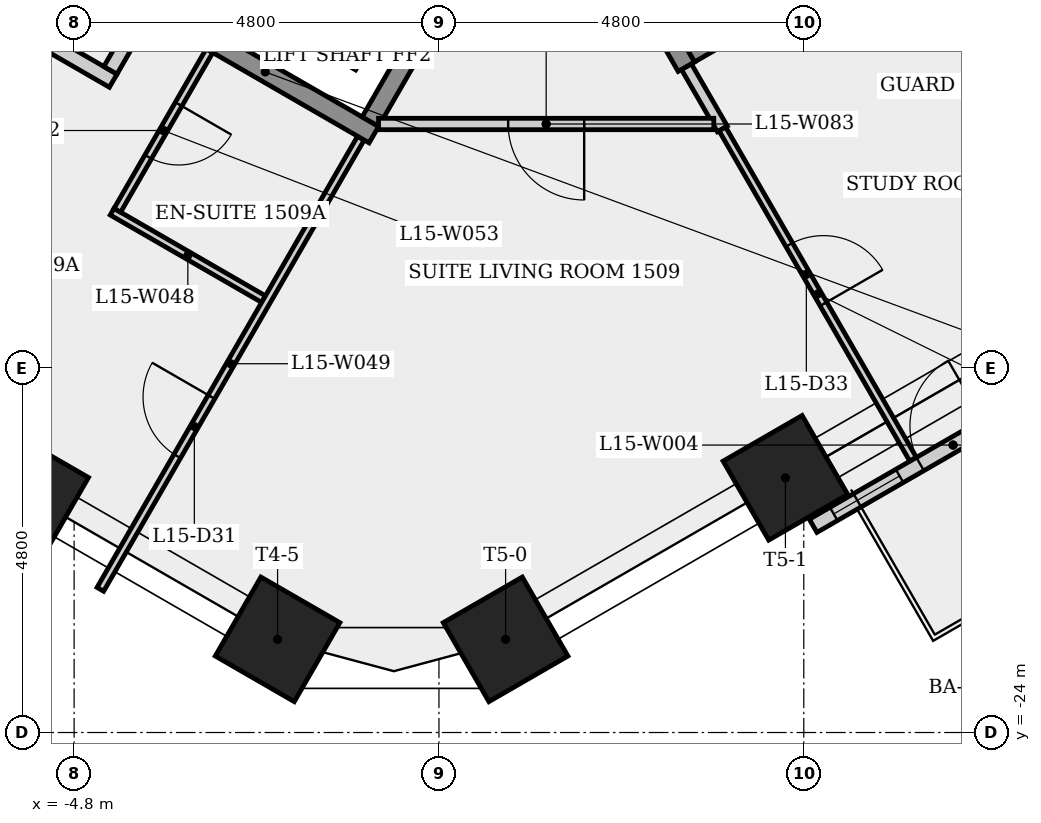
"""IFC4 building model, lengths in metres.
Left out: names, types, materials, properties, quantities, classifications, styles, units other than length and angle.
Written with IfcOpenShell. Run it as: python <this file> out.ifc"""

import sys

from ifc_helpers import new_model, si_unit, direction, frame, frame_2d, origin, origin_2d, place, context, subcontext, project, spatial, rectangle, extrude, element, fill, save


model = new_model("IFC4")
c1 = context("Model", 3, precision=1e-05, world=origin(), true_north=direction((0.0, 1.0)))
c2 = subcontext(c1, "Body", "Model", "MODEL_VIEW")
j1 = project(units=[si_unit("LENGTHUNIT", "METRE"), si_unit("PLANEANGLEUNIT", "RADIAN")], contexts=[c1])
p1 = place(None, origin())
s1 = spatial("IfcSite", under=j1, at=p1, CompositionType="ELEMENT")
p2 = place(p1, origin())
s2 = spatial("IfcBuilding", under=s1, at=p2, CompositionType="ELEMENT")
p3 = place(p2, frame((0.0, 0.0, 59.5)))
s3 = spatial("IfcBuildingStorey", under=s2, at=p3, CompositionType="ELEMENT", Elevation=59.5)
for number, where, z_axis, x_axis in (
    (1, (-5.431, -20.865, 0.0), (0.0, 0.0, 1.0), (-0.5, -0.866, 0.0)),
    (2, (-2.123, -22.774, 0.0), (0.0, 0.0, 1.0), (-0.5, -0.866, 0.0)),
    (3, (0.877, -22.774, 0.0), (0.0, 0.0, 1.0), (0.5, -0.866, 0.0)),
    (4, (4.558, -20.649, 0.0), (0.0, 0.0, 1.0), (0.5, -0.866, 0.0)),
):
    element("IfcColumn", number, at=place(p3, frame(where, z_axis=z_axis, x_axis=x_axis)), inside=s3, PredefinedType="COLUMN", context=c2, shape_type="SweptSolid", body=[
        extrude(rectangle(XDim=1.2, YDim=1.2, at=origin_2d()), origin(), (0.0, 0.0, 1.0), 3.4),
    ])
p4 = place(p3, frame((4.923, -21.281, 0.0), z_axis=(0.0, 0.0, 1.0), x_axis=(0.866036396571, 0.499980959452, 0.0)))
e5 = element("IfcWall", 5, at=p4, inside=s3, PredefinedType="SOLIDWALL", context=c2, shape_type="SweptSolid", body=[
    extrude(rectangle(XDim=4.251, YDim=0.2, at=frame_2d((2.125, 0.0))), origin(), (0.0, 0.0, 1.0), 3.4),
])
p5 = place(p4, frame((1.625, 0.0, 0.0)))
e6 = element("IfcOpeningElement", 6, at=p5, cuts=e5, PredefinedType="OPENING", context=c2, shape_type="SweptSolid", body=[
    extrude(rectangle(XDim=1.0, YDim=2.4, at=frame_2d((0.5, 1.2))), frame((0.0, 0.11, 0.0), z_axis=(0.0, -1.0, 0.0), x_axis=(1.0, 0.0, 0.0)), (0.0, 0.0, 1.0), 0.22),
])
p6 = place(p4, frame((0.313, 0.0, 0.9)))
e7 = element("IfcOpeningElement", 7, at=p6, cuts=e5, PredefinedType="OPENING", context=c2, shape_type="SweptSolid", body=[
    extrude(rectangle(XDim=1.0, YDim=1.5, at=frame_2d((0.5, 0.75))), frame((0.0, 0.11, 0.0), z_axis=(0.0, -1.0, 0.0), x_axis=(1.0, 0.0, 0.0)), (0.0, 0.0, 1.0), 0.22),
])
p7 = place(p4, frame((2.938, 0.0, 0.9)))
e8 = element("IfcOpeningElement", 8, at=p7, cuts=e5, PredefinedType="OPENING", context=c2, shape_type="SweptSolid", body=[
    extrude(rectangle(XDim=1.0, YDim=1.5, at=frame_2d((0.5, 0.75))), frame((0.0, 0.11, 0.0), z_axis=(0.0, -1.0, 0.0), x_axis=(1.0, 0.0, 0.0)), (0.0, 0.0, 1.0), 0.22),
])
p8 = place(p3, frame((-8.356, -13.073, 0.0), z_axis=(0.0, 0.0, 1.0), x_axis=(0.866038532462, -0.499977259774, 0.0)))
e9 = element("IfcWall", 9, at=p8, inside=s3, PredefinedType="PARTITIONING", context=c2, shape_type="SweptSolid", body=[
    extrude(rectangle(XDim=4.7, YDim=0.2, at=frame_2d((2.35, 0.0))), origin(), (0.0, 0.0, 1.0), 3.05),
])
p9 = place(p3, frame((-4.3, -17.147, 0.0), z_axis=(0.0, 0.0, 1.0), x_axis=(0.866053019151, -0.499952165731, 0.0)))
e10 = element("IfcWall", 10, at=p9, inside=s3, PredefinedType="PARTITIONING", context=c2, shape_type="SweptSolid", body=[
    extrude(rectangle(XDim=2.3, YDim=0.1, at=frame_2d((1.15, 0.0))), origin(), (0.0, 0.0, 1.0), 3.05),
])
p10 = place(p3, frame((-4.455, -22.116, 0.0), z_axis=(0.0, 0.0, 1.0), x_axis=(0.499984476993, 0.866034365811, 0.0)))
e11 = element("IfcWall", 11, at=p10, inside=s3, PredefinedType="PARTITIONING", context=c2, shape_type="SweptSolid", body=[
    extrude(rectangle(XDim=6.856, YDim=0.1, at=frame_2d((3.428, 0.0))), origin(), (0.0, 0.0, 1.0), 3.05),
])
p11 = place(p10, frame((2.023, 0.0, 0.0)))
e12 = element("IfcOpeningElement", 12, at=p11, cuts=e11, PredefinedType="OPENING", context=c2, shape_type="SweptSolid", body=[
    extrude(rectangle(XDim=0.9, YDim=2.1, at=frame_2d((0.45, 1.05))), frame((0.0, 0.06, 0.0), z_axis=(0.0, -1.0, 0.0), x_axis=(1.0, 0.0, 0.0)), (0.0, 0.0, 1.0), 0.12),
])
p12 = place(p3, frame((-3.885, -14.529, 0.0), z_axis=(0.0, 0.0, 1.0), x_axis=(-0.499859285417, -0.866106630146, 0.0)))
e13 = element("IfcWall", 13, at=p12, inside=s3, PredefinedType="PARTITIONING", context=c2, shape_type="SweptSolid", body=[
    extrude(rectangle(XDim=0.875, YDim=0.2, at=frame_2d((0.438, 0.0))), origin(), (0.0, 0.0, 1.0), 3.05),
])
p13 = place(p3, frame((-3.019, -15.029, 0.0), z_axis=(0.0, 0.0, 1.0), x_axis=(-0.499972286653, -0.866041403502, 0.0)))
e14 = element("IfcWall", 14, at=p13, inside=s3, PredefinedType="PARTITIONING", context=c2, shape_type="SweptSolid", body=[
    extrude(rectangle(XDim=2.425, YDim=0.1, at=frame_2d((1.212, 0.0))), origin(), (0.0, 0.0, 1.0), 3.05),
])
p14 = place(p13, frame((0.812, 0.0, 0.0)))
e15 = element("IfcOpeningElement", 15, at=p14, cuts=e14, PredefinedType="OPENING", context=c2, shape_type="SweptSolid", body=[
    extrude(rectangle(XDim=0.8, YDim=2.1, at=frame_2d((0.4, 1.05))), frame((0.0, 0.06, 0.0), z_axis=(0.0, -1.0, 0.0), x_axis=(1.0, 0.0, 0.0)), (0.0, 0.0, 1.0), 0.12),
])
p15 = place(p3, frame((-0.856, -16.133, 0.0), z_axis=(0.0, 0.0, 1.0), x_axis=(-0.866021716278, 0.500006386895, 0.0)))
e16 = element("IfcWall", 16, at=p15, inside=s3, PredefinedType="SHEAR", context=c2, shape_type="SweptSolid", body=[
    extrude(rectangle(XDim=3.3, YDim=0.25, at=frame_2d((1.65, 0.0))), origin(), (0.0, 0.0, 1.0), 3.05),
])
p16 = place(p3, frame((-0.902, -15.962, 0.0), z_axis=(0.0, 0.0, 1.0), x_axis=(0.499981517636, 0.866036074319, 0.0)))
e17 = element("IfcWall", 17, at=p16, inside=s3, PredefinedType="SHEAR", context=c2, shape_type="SweptSolid", body=[
    extrude(rectangle(XDim=2.61, YDim=0.25, at=frame_2d((1.305, 0.0))), origin(), (0.0, 0.0, 1.0), 3.05),
])
p17 = place(p3, frame((3.256, -15.239, 0.0), z_axis=(0.0, 0.0, 1.0), x_axis=(0.499886281871, -0.866091049023, 0.0)))
e18 = element("IfcWall", 18, at=p17, inside=s3, PredefinedType="PARTITIONING", context=c2, shape_type="SweptSolid", body=[
    extrude(rectangle(XDim=0.946, YDim=0.15, at=frame_2d((0.473, 0.0))), origin(), (0.0, 0.0, 1.0), 3.05),
])
p18 = place(p3, frame((3.256, -15.239, 0.0), z_axis=(0.0, 0.0, 1.0), x_axis=(-0.50002537861, 0.866010750942, 0.0)))
e19 = element("IfcWall", 19, at=p18, inside=s3, PredefinedType="SHEAR", context=c2, shape_type="SweptSolid", body=[
    extrude(rectangle(XDim=3.0, YDim=0.25, at=frame_2d((1.5, 0.0))), origin(), (0.0, 0.0, 1.0), 3.05),
])
p19 = place(p3, frame((3.616, -15.993, 0.0), z_axis=(0.0, 0.0, 1.0), x_axis=(-1.0, 0.0, 0.0)))
e20 = element("IfcWall", 20, at=p19, inside=s3, PredefinedType="PARTITIONING", context=c2, shape_type="SweptSolid", body=[
    extrude(rectangle(XDim=4.411, YDim=0.15, at=frame_2d((2.206, 0.0))), origin(), (0.0, 0.0, 1.0), 3.05),
])
p20 = place(p19, frame((1.706, 0.0, 0.0)))
e21 = element("IfcOpeningElement", 21, at=p20, cuts=e20, PredefinedType="OPENING", context=c2, shape_type="SweptSolid", body=[
    extrude(rectangle(XDim=1.0, YDim=2.1, at=frame_2d((0.5, 1.05))), frame((0.0, 0.085, 0.0), z_axis=(0.0, -1.0, 0.0), x_axis=(1.0, 0.0, 0.0)), (0.0, 0.0, 1.0), 0.17),
])
p21 = place(p3, frame((3.729, -16.058, 0.0), z_axis=(0.0, 0.0, 1.0), x_axis=(0.50000754391, -0.866021048262, 0.0)))
e22 = element("IfcWall", 22, at=p21, inside=s3, PredefinedType="PARTITIONING", context=c2, shape_type="SweptSolid", body=[
    extrude(rectangle(XDim=5.016, YDim=0.1, at=frame_2d((2.508, 0.0))), origin(), (0.0, 0.0, 1.0), 3.05),
])
p22 = place(p21, frame((1.76, 0.0, 0.0)))
e23 = element("IfcOpeningElement", 23, at=p22, cuts=e22, PredefinedType="OPENING", context=c2, shape_type="SweptSolid", body=[
    extrude(rectangle(XDim=0.9, YDim=2.1, at=frame_2d((0.45, 1.05))), frame((0.0, 0.06, 0.0), z_axis=(0.0, -1.0, 0.0), x_axis=(1.0, 0.0, 0.0)), (0.0, 0.0, 1.0), 0.12),
])
p23 = place(p3, frame((3.301, -15.068, 0.0), z_axis=(0.0, 0.0, 1.0), x_axis=(0.866035036182, 0.499983315828, 0.0)))
e24 = element("IfcWall", 24, at=p23, inside=s3, PredefinedType="SHEAR", context=c2, shape_type="SweptSolid", body=[
    extrude(rectangle(XDim=6.4, YDim=0.25, at=frame_2d((3.2, 0.0))), origin(), (0.0, 0.0, 1.0), 3.05),
])
p24 = place(p5, origin())
e25 = element("IfcDoor", 25, at=p24, inside=s3, OperationType="SINGLE_SWING_RIGHT", PredefinedType="DOOR", context=c2, shape_type="SweptSolid", body=[
    extrude(rectangle(XDim=1.0, YDim=2.4, at=frame_2d((0.5, 1.2))), frame((0.0, 0.025, 0.0), z_axis=(0.0, -1.0, 0.0), x_axis=(1.0, 0.0, 0.0)), (0.0, 0.0, 1.0), 0.05),
])
fill(e6, e25)
p25 = place(p6, origin())
e26 = element("IfcWindow", 26, at=p25, inside=s3, PartitioningType="SINGLE_PANEL", PredefinedType="WINDOW", context=c2, shape_type="SweptSolid", body=[
    extrude(rectangle(XDim=1.0, YDim=1.5, at=frame_2d((0.5, 0.75))), frame((0.0, 0.03, 0.0), z_axis=(0.0, -1.0, 0.0), x_axis=(1.0, 0.0, 0.0)), (0.0, 0.0, 1.0), 0.06),
])
fill(e7, e26)
p26 = place(p20, origin())
e27 = element("IfcDoor", 27, at=p26, inside=s3, OperationType="SINGLE_SWING_LEFT", PredefinedType="DOOR", context=c2, shape_type="SweptSolid", body=[
    extrude(rectangle(XDim=1.0, YDim=2.1, at=frame_2d((0.5, 1.05))), frame((0.0, 0.025, 0.0), z_axis=(0.0, -1.0, 0.0), x_axis=(1.0, 0.0, 0.0)), (0.0, 0.0, 1.0), 0.05),
])
fill(e21, e27)
p27 = place(p11, origin())
e28 = element("IfcDoor", 28, at=p27, inside=s3, OperationType="SINGLE_SWING_RIGHT", PredefinedType="DOOR", context=c2, shape_type="SweptSolid", body=[
    extrude(rectangle(XDim=0.9, YDim=2.1, at=frame_2d((0.45, 1.05))), frame((0.0, 0.025, 0.0), z_axis=(0.0, -1.0, 0.0), x_axis=(1.0, 0.0, 0.0)), (0.0, 0.0, 1.0), 0.05),
])
fill(e12, e28)
p28 = place(p14, origin())
e29 = element("IfcDoor", 29, at=p28, inside=s3, OperationType="SINGLE_SWING_LEFT", PredefinedType="DOOR", context=c2, shape_type="SweptSolid", body=[
    extrude(rectangle(XDim=0.8, YDim=2.1, at=frame_2d((0.4, 1.05))), frame((0.0, 0.025, 0.0), z_axis=(0.0, -1.0, 0.0), x_axis=(1.0, 0.0, 0.0)), (0.0, 0.0, 1.0), 0.05),
])
fill(e15, e29)
p29 = place(p22, origin())
e30 = element("IfcDoor", 30, at=p29, inside=s3, OperationType="SINGLE_SWING_RIGHT", PredefinedType="DOOR", context=c2, shape_type="SweptSolid", body=[
    extrude(rectangle(XDim=0.9, YDim=2.1, at=frame_2d((0.45, 1.05))), frame((0.0, 0.025, 0.0), z_axis=(0.0, -1.0, 0.0), x_axis=(1.0, 0.0, 0.0)), (0.0, 0.0, 1.0), 0.05),
])
fill(e23, e30)
save(model, sys.argv[1])
